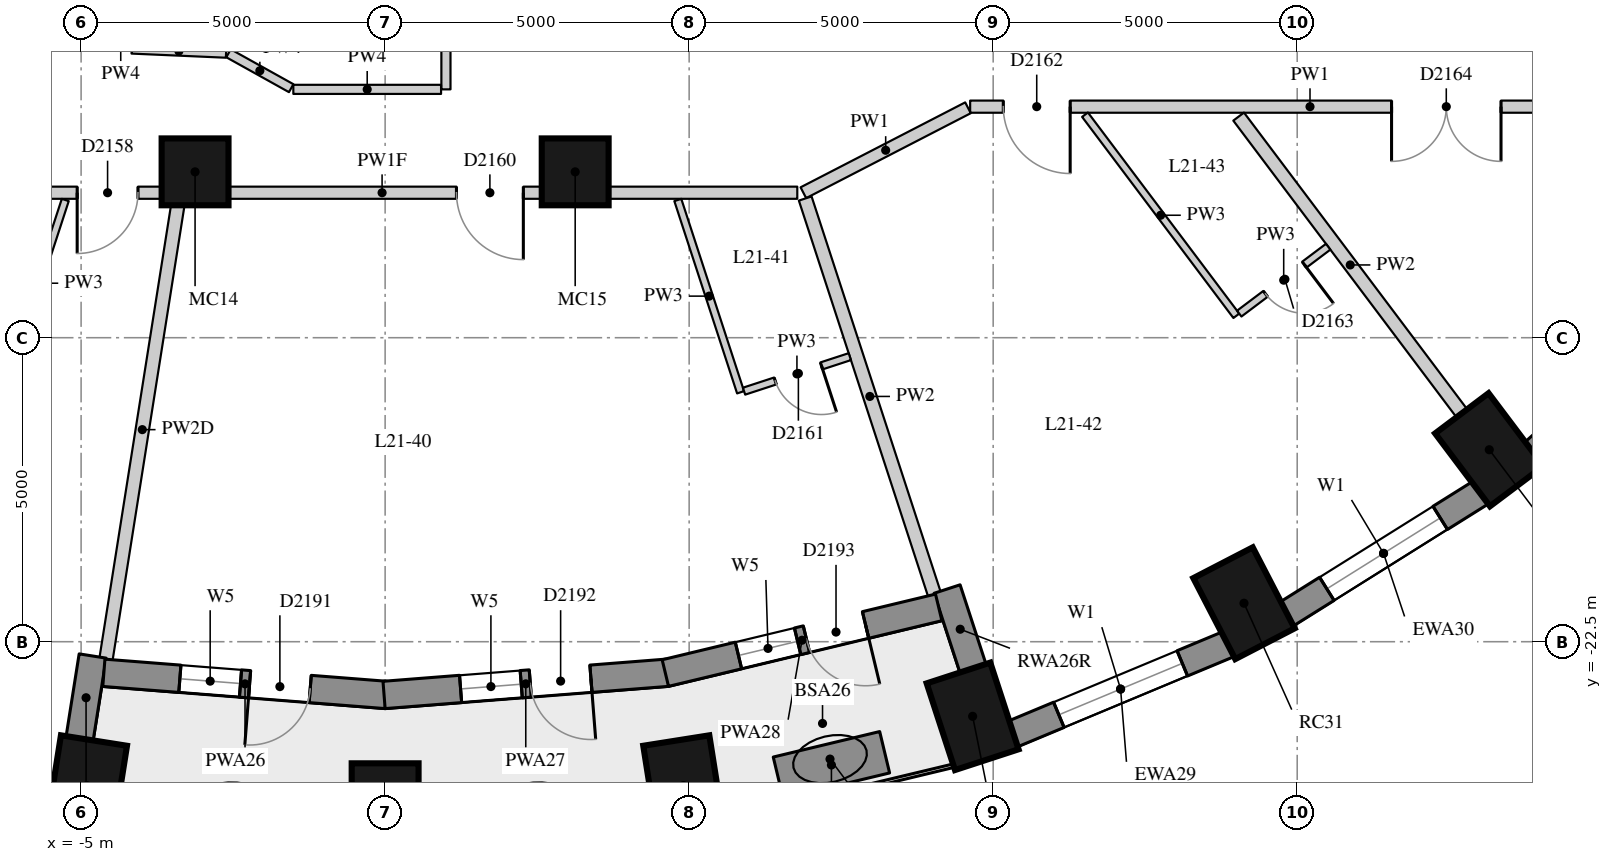
"""IFC4 building model, lengths in metres.
Left out: names, types, materials, properties, quantities, classifications, styles, units other than length and angle.
Written with IfcOpenShell. Run it as: python <this file> out.ifc"""

import sys

from ifc_helpers import new_model, si_unit, direction, frame, frame_2d, origin, origin_2d, place, context, subcontext, project, spatial, rectangle, extrude, element, fill, save


model = new_model("IFC4")
c1 = context("Model", 3, precision=1e-05, world=origin(), true_north=direction((0.0, 1.0)))
c2 = subcontext(c1, "Body", "Model", "MODEL_VIEW")
j1 = project(units=[si_unit("LENGTHUNIT", "METRE"), si_unit("PLANEANGLEUNIT", "RADIAN")], contexts=[c1])
p1 = place(None, origin())
s1 = spatial("IfcSite", under=j1, at=p1, CompositionType="ELEMENT")
p2 = place(p1, origin())
s2 = spatial("IfcBuilding", under=s1, at=p2, CompositionType="ELEMENT")
p3 = place(p2, frame((0.0, 0.0, 77.8)))
s3 = spatial("IfcBuildingStorey", under=s2, at=p3, CompositionType="ELEMENT", Elevation=77.8)
for number, where, z_axis, x_axis in (
    (1, (-4.906, -24.866, 0.0), (0.0, 0.0, 1.0), (-0.156, -0.988, 0.0)),
    (2, (0.0, -25.25, 0.0), (0.0, 0.0, 1.0), (0.0, -1.0, 0.0)),
    (3, (4.906, -24.866, 0.0), (0.0, 0.0, 1.0), (0.156, -0.988, 0.0)),
    (4, (9.662, -23.727, 0.0), (0.0, 0.0, 1.0), (0.31, -0.951, 0.0)),
    (5, (14.125, -21.867, 0.0), (0.0, 0.0, 1.0), (0.46, -0.888, 0.0)),
    (6, (18.159, -19.343, 0.0), (0.0, 0.0, 1.0), (0.601, -0.799, 0.0)),
):
    element("IfcColumn", number, at=place(p3, frame(where, z_axis=z_axis, x_axis=x_axis)), inside=s3, PredefinedType="COLUMN", context=c2, shape_type="SweptSolid", body=[
        extrude(rectangle(XDim=1.5, YDim=1.1, at=origin_2d()), origin(), (0.0, 0.0, 1.0), 3.3),
    ])
for number, where, z_axis, x_axis in (
    (7, (-3.126, -14.772, 0.0), (0.0, 0.0, 1.0), (1.0, 0.0, 0.0)),
    (8, (3.126, -14.772, 0.0), (0.0, 0.0, 1.0), (1.0, 0.0, 0.0)),
):
    element("IfcColumn", number, at=place(p3, frame(where, z_axis=z_axis, x_axis=x_axis)), inside=s3, PredefinedType="COLUMN", context=c2, shape_type="SweptSolid", body=[
        extrude(rectangle(XDim=1.1, YDim=1.1, at=origin_2d()), origin(), (0.0, 0.0, 1.0), 3.3),
    ])
p4 = place(p3, frame((-9.308, -24.35, 0.0), z_axis=(0.0, 0.0, 1.0), x_axis=(0.972496561493, -0.232917233979, 0.0)))
e9 = element("IfcWall", 9, at=p4, inside=s3, PredefinedType="SOLIDWALL", context=c2, shape_type="SweptSolid", body=[
    extrude(rectangle(XDim=3.911, YDim=0.45, at=frame_2d((1.956, 0.0))), origin(), (0.0, 0.0, 1.0), 3.02),
])
p5 = place(p4, frame((0.855, 0.0, 0.4)))
e10 = element("IfcOpeningElement", 10, at=p5, cuts=e9, PredefinedType="OPENING", context=c2, shape_type="SweptSolid", body=[
    extrude(rectangle(XDim=2.2, YDim=1.75, at=frame_2d((1.1, 0.875))), frame((0.0, 0.235, 0.0), z_axis=(0.0, -1.0, 0.0), x_axis=(1.0, 0.0, 0.0)), (0.0, 0.0, 1.0), 0.47),
])
p6 = place(p3, frame((10.315, -24.021, 0.0), z_axis=(0.0, 0.0, 1.0), x_axis=(0.923031964282, 0.384723267966, 0.0)))
e11 = element("IfcWall", 11, at=p6, inside=s3, PredefinedType="SOLIDWALL", context=c2, shape_type="SweptSolid", body=[
    extrude(rectangle(XDim=3.856, YDim=0.45, at=frame_2d((1.928, 0.0))), origin(), (0.0, 0.0, 1.0), 3.02),
])
p7 = place(p6, frame((0.828, 0.0, 0.4)))
e12 = element("IfcOpeningElement", 12, at=p7, cuts=e11, PredefinedType="OPENING", context=c2, shape_type="SweptSolid", body=[
    extrude(rectangle(XDim=2.2, YDim=1.75, at=frame_2d((1.1, 0.875))), frame((0.0, 0.235, 0.0), z_axis=(0.0, -1.0, 0.0), x_axis=(1.0, 0.0, 0.0)), (0.0, 0.0, 1.0), 0.47),
])
p8 = place(p3, frame((14.817, -22.051, 0.0), z_axis=(0.0, 0.0, 1.0), x_axis=(0.847635480093, 0.530579016629, 0.0)))
e13 = element("IfcWall", 13, at=p8, inside=s3, PredefinedType="SOLIDWALL", context=c2, shape_type="SweptSolid", body=[
    extrude(rectangle(XDim=3.782, YDim=0.45, at=frame_2d((1.891, 0.0))), origin(), (0.0, 0.0, 1.0), 3.02),
])
p9 = place(p8, frame((0.791, 0.0, 0.4)))
e14 = element("IfcOpeningElement", 14, at=p9, cuts=e13, PredefinedType="OPENING", context=c2, shape_type="SweptSolid", body=[
    extrude(rectangle(XDim=2.2, YDim=1.75, at=frame_2d((1.1, 0.875))), frame((0.0, 0.235, 0.0), z_axis=(0.0, -1.0, 0.0), x_axis=(1.0, 0.0, 0.0)), (0.0, 0.0, 1.0), 0.47),
])
p10 = place(p3, frame((18.871, -19.407, 0.0), z_axis=(0.0, 0.0, 1.0), x_axis=(0.745526233716, 0.66647628228, 0.0)))
e15 = element("IfcWall", 15, at=p10, inside=s3, PredefinedType="SOLIDWALL", context=c2, shape_type="SweptSolid", body=[
    extrude(rectangle(XDim=3.697, YDim=0.45, at=frame_2d((1.848, 0.0))), origin(), (0.0, 0.0, 1.0), 3.02),
])
p11 = place(p3, frame((-5.027, -24.108, 0.0), z_axis=(0.0, 0.0, 1.0), x_axis=(0.156133927791, 0.98773589415, 0.0)))
e16 = element("IfcWall", 16, at=p11, inside=s3, PredefinedType="SOLIDWALL", context=c2, shape_type="SweptSolid", body=[
    extrude(rectangle(XDim=1.39, YDim=0.45, at=frame_2d((0.695, 0.0))), origin(), (0.0, 0.0, 1.0), 2.47),
])
p12 = place(p3, frame((9.674, -22.956, 0.0), z_axis=(0.0, 0.0, 1.0), x_axis=(-0.310269011655, 0.950648799719, 0.0)))
e17 = element("IfcWall", 17, at=p12, inside=s3, PredefinedType="SOLIDWALL", context=c2, shape_type="SweptSolid", body=[
    extrude(rectangle(XDim=1.39, YDim=0.45, at=frame_2d((0.695, 0.0))), origin(), (0.0, 0.0, 1.0), 3.02),
])
p13 = place(p3, frame((-4.626, -23.011, 0.0), z_axis=(0.0, 0.0, 1.0), x_axis=(0.996937095772, -0.078207589615, 0.0)))
e18 = element("IfcWall", 18, at=p13, inside=s3, PredefinedType="SOLIDWALL", context=c2, shape_type="SweptSolid", body=[
    extrude(rectangle(XDim=4.657, YDim=0.45, at=frame_2d((2.329, 0.0))), origin(), (0.0, 0.0, 1.0), 3.02),
])
p14 = place(p13, frame((1.254, 0.0, 0.4)))
e19 = element("IfcOpeningElement", 19, at=p14, cuts=e18, PredefinedType="OPENING", context=c2, shape_type="SweptSolid", body=[
    extrude(rectangle(XDim=1.0, YDim=1.75, at=frame_2d((0.5, 0.875))), frame((0.0, 0.235, 0.0), z_axis=(0.0, -1.0, 0.0), x_axis=(1.0, 0.0, 0.0)), (0.0, 0.0, 1.0), 0.47),
])
p15 = place(p13, frame((2.404, 0.0, 0.0)))
e20 = element("IfcOpeningElement", 20, at=p15, cuts=e18, PredefinedType="OPENING", context=c2, shape_type="SweptSolid", body=[
    extrude(rectangle(XDim=1.0, YDim=2.15, at=frame_2d((0.5, 1.075))), frame((0.0, 0.235, 0.0), z_axis=(0.0, -1.0, 0.0), x_axis=(1.0, 0.0, 0.0)), (0.0, 0.0, 1.0), 0.47),
])
p16 = place(p3, frame((-0.018, -23.376, 0.0), z_axis=(0.0, 0.0, 1.0), x_axis=(0.996935982964, 0.078221773648, 0.0)))
e21 = element("IfcWall", 21, at=p16, inside=s3, PredefinedType="SOLIDWALL", context=c2, shape_type="SweptSolid", body=[
    extrude(rectangle(XDim=4.676, YDim=0.45, at=frame_2d((2.338, 0.0))), origin(), (0.0, 0.0, 1.0), 3.02),
])
p17 = place(p16, frame((1.263, 0.0, 0.4)))
e22 = element("IfcOpeningElement", 22, at=p17, cuts=e21, PredefinedType="OPENING", context=c2, shape_type="SweptSolid", body=[
    extrude(rectangle(XDim=1.0, YDim=1.75, at=frame_2d((0.5, 0.875))), frame((0.0, 0.235, 0.0), z_axis=(0.0, -1.0, 0.0), x_axis=(1.0, 0.0, 0.0)), (0.0, 0.0, 1.0), 0.47),
])
p18 = place(p16, frame((2.413, 0.0, 0.0)))
e23 = element("IfcOpeningElement", 23, at=p18, cuts=e21, PredefinedType="OPENING", context=c2, shape_type="SweptSolid", body=[
    extrude(rectangle(XDim=1.0, YDim=2.15, at=frame_2d((0.5, 1.075))), frame((0.0, 0.235, 0.0), z_axis=(0.0, -1.0, 0.0), x_axis=(1.0, 0.0, 0.0)), (0.0, 0.0, 1.0), 0.47),
])
p19 = place(p3, frame((4.608, -23.016, 0.0), z_axis=(0.0, 0.0, 1.0), x_axis=(0.972343667289, 0.233554688847, 0.0)))
e24 = element("IfcWall", 24, at=p19, inside=s3, PredefinedType="SOLIDWALL", context=c2, shape_type="SweptSolid", body=[
    extrude(rectangle(XDim=4.624, YDim=0.45, at=frame_2d((2.312, 0.0))), origin(), (0.0, 0.0, 1.0), 3.02),
])
p20 = place(p19, frame((1.237, 0.0, 0.4)))
e25 = element("IfcOpeningElement", 25, at=p20, cuts=e24, PredefinedType="OPENING", context=c2, shape_type="SweptSolid", body=[
    extrude(rectangle(XDim=1.0, YDim=1.75, at=frame_2d((0.5, 0.875))), frame((0.0, 0.235, 0.0), z_axis=(0.0, -1.0, 0.0), x_axis=(1.0, 0.0, 0.0)), (0.0, 0.0, 1.0), 0.47),
])
p21 = place(p19, frame((2.387, 0.0, 0.0)))
e26 = element("IfcOpeningElement", 26, at=p21, cuts=e24, PredefinedType="OPENING", context=c2, shape_type="SweptSolid", body=[
    extrude(rectangle(XDim=1.0, YDim=2.15, at=frame_2d((0.5, 1.075))), frame((0.0, 0.235, 0.0), z_axis=(0.0, -1.0, 0.0), x_axis=(1.0, 0.0, 0.0)), (0.0, 0.0, 1.0), 0.47),
])
p22 = place(p3, frame((6.465, -24.737, 0.0), z_axis=(0.0, 0.0, 1.0), x_axis=(0.972504142103, 0.232885580473, 0.0)))
e27 = element("IfcWall", 27, at=p22, inside=s3, PredefinedType="USERDEFINED", context=c2, shape_type="SweptSolid", body=[
    extrude(rectangle(XDim=1.8, YDim=0.7, at=frame_2d((0.9, 0.0))), origin(), (0.0, 0.0, 1.0), 0.75),
])
p23 = place(p3, frame((20.8, -13.7, 0.0), z_axis=(0.0, 0.0, 1.0), x_axis=(-1.0, 0.0, 0.0)))
e28 = element("IfcWall", 28, at=p23, inside=s3, PredefinedType="PARTITIONING", context=c2, shape_type="SweptSolid", body=[
    extrude(rectangle(XDim=11.178, YDim=0.2, at=frame_2d((5.589, 0.0))), origin(), (0.0, 0.0, 1.0), 3.02),
])
p24 = place(p23, frame((9.534, 0.0, 0.0)))
e29 = element("IfcOpeningElement", 29, at=p24, cuts=e28, PredefinedType="OPENING", context=c2, shape_type="SweptSolid", body=[
    extrude(rectangle(XDim=1.1, YDim=2.1, at=frame_2d((0.55, 1.05))), frame((0.0, 0.11, 0.0), z_axis=(0.0, -1.0, 0.0), x_axis=(1.0, 0.0, 0.0)), (0.0, 0.0, 1.0), 0.22),
])
p25 = place(p23, frame((2.448, 0.0, 0.0)))
e30 = element("IfcOpeningElement", 30, at=p25, cuts=e28, PredefinedType="OPENING", context=c2, shape_type="SweptSolid", body=[
    extrude(rectangle(XDim=1.8, YDim=2.1, at=frame_2d((0.9, 1.05))), frame((0.0, 0.11, 0.0), z_axis=(0.0, -1.0, 0.0), x_axis=(1.0, 0.0, 0.0)), (0.0, 0.0, 1.0), 0.22),
])
p26 = place(p3, frame((9.586, -13.719, 0.0), z_axis=(0.0, 0.0, 1.0), x_axis=(-0.888664904046, -0.458557181076, 0.0)))
e31 = element("IfcWall", 31, at=p26, inside=s3, PredefinedType="PARTITIONING", context=c2, shape_type="SweptSolid", body=[
    extrude(rectangle(XDim=3.046, YDim=0.2, at=frame_2d((1.523, 0.0))), origin(), (0.0, 0.0, 1.0), 3.02),
])
p27 = place(p3, frame((6.778, -15.115, 0.0), z_axis=(0.0, 0.0, 1.0), x_axis=(-1.0, 0.0, 0.0)))
e32 = element("IfcWall", 32, at=p27, inside=s3, PredefinedType="PARTITIONING", context=c2, shape_type="SweptSolid", body=[
    extrude(rectangle(XDim=13.657, YDim=0.2, at=frame_2d((6.828, 0.0))), origin(), (0.0, 0.0, 1.0), 2.42),
])
p28 = place(p27, frame((10.843, 0.0, 0.0)))
e33 = element("IfcOpeningElement", 33, at=p28, cuts=e32, PredefinedType="OPENING", context=c2, shape_type="SweptSolid", body=[
    extrude(rectangle(XDim=1.0, YDim=2.1, at=frame_2d((0.5, 1.05))), frame((0.0, 0.11, 0.0), z_axis=(0.0, -1.0, 0.0), x_axis=(1.0, 0.0, 0.0)), (0.0, 0.0, 1.0), 0.22),
])
p29 = place(p27, frame((4.505, 0.0, 0.0)))
e34 = element("IfcOpeningElement", 34, at=p29, cuts=e32, PredefinedType="OPENING", context=c2, shape_type="SweptSolid", body=[
    extrude(rectangle(XDim=1.1, YDim=2.1, at=frame_2d((0.55, 1.05))), frame((0.0, 0.11, 0.0), z_axis=(0.0, -1.0, 0.0), x_axis=(1.0, 0.0, 0.0)), (0.0, 0.0, 1.0), 0.22),
])
p30 = place(p3, frame((1.0, -9.23, 0.0), z_axis=(0.0, 0.0, 1.0), x_axis=(0.0, -1.0, 0.0)))
e35 = element("IfcWall", 35, at=p30, inside=s3, PredefinedType="PARTITIONING", context=c2, shape_type="SweptSolid", body=[
    extrude(rectangle(XDim=4.186, YDim=0.15, at=frame_2d((2.093, 0.0))), origin(), (0.0, 0.0, 1.0), 3.02),
])
p31 = place(p3, frame((0.92, -13.416, 0.0), z_axis=(0.0, 0.0, 1.0), x_axis=(-1.0, 0.0, 0.0)))
e36 = element("IfcWall", 36, at=p31, inside=s3, PredefinedType="PARTITIONING", context=c2, shape_type="SweptSolid", body=[
    extrude(rectangle(XDim=2.43, YDim=0.15, at=frame_2d((1.215, 0.0))), origin(), (0.0, 0.0, 1.0), 3.02),
])
p32 = place(p3, frame((-1.545, -13.396, 0.0), z_axis=(0.0, 0.0, 1.0), x_axis=(-0.873678559566, 0.486503622345, 0.0)))
e37 = element("IfcWall", 37, at=p32, inside=s3, PredefinedType="PARTITIONING", context=c2, shape_type="SweptSolid", body=[
    extrude(rectangle(XDim=1.18, YDim=0.15, at=frame_2d((0.59, 0.0))), origin(), (0.0, 0.0, 1.0), 3.02),
])
p33 = place(p3, frame((-2.616, -12.82, 0.0), z_axis=(0.0, 0.0, 1.0), x_axis=(-0.99904515517, 0.04368956318, 0.0)))
e38 = element("IfcWall", 38, at=p33, inside=s3, PredefinedType="PARTITIONING", context=c2, shape_type="SweptSolid", body=[
    extrude(rectangle(XDim=1.553, YDim=0.15, at=frame_2d((0.777, 0.0))), origin(), (0.0, 0.0, 1.0), 3.02),
])
p34 = place(p3, frame((-4.591, -22.789, 0.0), z_axis=(0.0, 0.0, 1.0), x_axis=(0.156151107863, 0.987733178299, 0.0)))
e39 = element("IfcWall", 39, at=p34, inside=s3, PredefinedType="PARTITIONING", context=c2, shape_type="SweptSolid", body=[
    extrude(rectangle(XDim=7.647, YDim=0.22, at=frame_2d((3.823, 0.0))), origin(), (0.0, 0.0, 1.0), 2.47),
])
p35 = place(p3, frame((9.034, -21.721, 0.0), z_axis=(0.0, 0.0, 1.0), x_axis=(-0.310286072156, 0.95064323141, 0.0)))
e40 = element("IfcWall", 40, at=p35, inside=s3, PredefinedType="PARTITIONING", context=c2, shape_type="SweptSolid", body=[
    extrude(rectangle(XDim=6.849, YDim=0.22, at=frame_2d((3.424, 0.0))), origin(), (0.0, 0.0, 1.0), 3.02),
])
p36 = place(p3, frame((17.708, -18.743, 0.0), z_axis=(0.0, 0.0, 1.0), x_axis=(-0.601170031872, 0.799121137738, 0.0)))
e41 = element("IfcWall", 41, at=p36, inside=s3, PredefinedType="PARTITIONING", context=c2, shape_type="SweptSolid", body=[
    extrude(rectangle(XDim=6.106, YDim=0.22, at=frame_2d((3.053, 0.0))), origin(), (0.0, 0.0, 1.0), 3.02),
])
p37 = place(p3, frame((-5.26, -15.235, 0.0), z_axis=(0.0, 0.0, 1.0), x_axis=(-0.310220453498, -0.950664646567, 0.0)))
e42 = element("IfcWall", 42, at=p37, inside=s3, PredefinedType="PARTITIONING", context=c2, shape_type="SweptSolid", body=[
    extrude(rectangle(XDim=2.88, YDim=0.12, at=frame_2d((1.44, 0.0))), origin(), (0.0, 0.0, 1.0), 3.02),
])
p38 = place(p3, frame((4.813, -15.235, 0.0), z_axis=(0.0, 0.0, 1.0), x_axis=(0.310233981264, -0.950660232086, 0.0)))
e43 = element("IfcWall", 43, at=p38, inside=s3, PredefinedType="PARTITIONING", context=c2, shape_type="SweptSolid", body=[
    extrude(rectangle(XDim=3.327, YDim=0.12, at=frame_2d((1.664, 0.0))), origin(), (0.0, 0.0, 1.0), 3.02),
])
p39 = place(p3, frame((11.51, -13.832, 0.0), z_axis=(0.0, 0.0, 1.0), x_axis=(0.60115060605, -0.7991357512, 0.0)))
e44 = element("IfcWall", 44, at=p39, inside=s3, PredefinedType="PARTITIONING", context=c2, shape_type="SweptSolid", body=[
    extrude(rectangle(XDim=4.14, YDim=0.12, at=frame_2d((2.07, 0.0))), origin(), (0.0, 0.0, 1.0), 3.02),
])
p40 = place(p3, frame((5.903, -18.379, 0.0), z_axis=(0.0, 0.0, 1.0), x_axis=(0.950626343776, 0.310337807105, 0.0)))
e45 = element("IfcWall", 45, at=p40, inside=s3, PredefinedType="PARTITIONING", context=c2, shape_type="SweptSolid", body=[
    extrude(rectangle(XDim=1.83, YDim=0.12, at=frame_2d((0.915, 0.0))), origin(), (0.0, 0.0, 1.0), 3.02),
])
p41 = place(p40, frame((0.54, 0.0, 0.0)))
e46 = element("IfcOpeningElement", 46, at=p41, cuts=e45, PredefinedType="OPENING", context=c2, shape_type="SweptSolid", body=[
    extrude(rectangle(XDim=0.8, YDim=2.1, at=frame_2d((0.4, 1.05))), frame((0.0, 0.07, 0.0), z_axis=(0.0, -1.0, 0.0), x_axis=(1.0, 0.0, 0.0)), (0.0, 0.0, 1.0), 0.14),
])
p42 = place(p3, frame((14.047, -17.104, 0.0), z_axis=(0.0, 0.0, 1.0), x_axis=(0.799182868338, 0.601087966071, 0.0)))
e47 = element("IfcWall", 47, at=p42, inside=s3, PredefinedType="PARTITIONING", context=c2, shape_type="SweptSolid", body=[
    extrude(rectangle(XDim=1.83, YDim=0.12, at=frame_2d((0.915, 0.0))), origin(), (0.0, 0.0, 1.0), 3.02),
])
p43 = place(p42, frame((0.54, 0.0, 0.0)))
e48 = element("IfcOpeningElement", 48, at=p43, cuts=e47, PredefinedType="OPENING", context=c2, shape_type="SweptSolid", body=[
    extrude(rectangle(XDim=0.8, YDim=2.1, at=frame_2d((0.4, 1.05))), frame((0.0, 0.07, 0.0), z_axis=(0.0, -1.0, 0.0), x_axis=(1.0, 0.0, 0.0)), (0.0, 0.0, 1.0), 0.14),
])
p44 = place(p7, origin())
e49 = element("IfcWindow", 49, at=p44, inside=s3, PartitioningType="SINGLE_PANEL", PredefinedType="WINDOW", context=c2, shape_type="SweptSolid", body=[
    extrude(rectangle(XDim=2.2, YDim=1.75, at=frame_2d((1.1, 0.875))), frame((0.0, 0.035, 0.0), z_axis=(0.0, -1.0, 0.0), x_axis=(1.0, 0.0, 0.0)), (0.0, 0.0, 1.0), 0.06),
])
fill(e12, e49)
p45 = place(p9, origin())
e50 = element("IfcWindow", 50, at=p45, inside=s3, PartitioningType="SINGLE_PANEL", PredefinedType="WINDOW", context=c2, shape_type="SweptSolid", body=[
    extrude(rectangle(XDim=2.2, YDim=1.75, at=frame_2d((1.1, 0.875))), frame((0.0, 0.035, 0.0), z_axis=(0.0, -1.0, 0.0), x_axis=(1.0, 0.0, 0.0)), (0.0, 0.0, 1.0), 0.06),
])
fill(e14, e50)
p46 = place(p14, origin())
e51 = element("IfcWindow", 51, at=p46, inside=s3, PartitioningType="SINGLE_PANEL", PredefinedType="WINDOW", context=c2, shape_type="SweptSolid", body=[
    extrude(rectangle(XDim=1.0, YDim=1.75, at=frame_2d((0.5, 0.875))), frame((0.0, 0.035, 0.0), z_axis=(0.0, -1.0, 0.0), x_axis=(1.0, 0.0, 0.0)), (0.0, 0.0, 1.0), 0.06),
])
fill(e19, e51)
p47 = place(p15, frame((1.0, 0.0, 0.0), z_axis=(0.0, 0.0, 1.0), x_axis=(-1.0, 0.0, 0.0)))
e52 = element("IfcDoor", 52, at=p47, inside=s3, OperationType="SINGLE_SWING_RIGHT", PredefinedType="DOOR", context=c2, shape_type="SweptSolid", body=[
    extrude(rectangle(XDim=1.0, YDim=2.15, at=frame_2d((0.5, 1.075))), frame((0.0, 0.075, 0.0), z_axis=(0.0, -1.0, 0.0), x_axis=(1.0, 0.0, 0.0)), (0.0, 0.0, 1.0), 0.05),
])
fill(e20, e52)
p48 = place(p17, origin())
e53 = element("IfcWindow", 53, at=p48, inside=s3, PartitioningType="SINGLE_PANEL", PredefinedType="WINDOW", context=c2, shape_type="SweptSolid", body=[
    extrude(rectangle(XDim=1.0, YDim=1.75, at=frame_2d((0.5, 0.875))), frame((0.0, 0.035, 0.0), z_axis=(0.0, -1.0, 0.0), x_axis=(1.0, 0.0, 0.0)), (0.0, 0.0, 1.0), 0.06),
])
fill(e22, e53)
p49 = place(p18, frame((1.0, 0.0, 0.0), z_axis=(0.0, 0.0, 1.0), x_axis=(-1.0, 0.0, 0.0)))
e54 = element("IfcDoor", 54, at=p49, inside=s3, OperationType="SINGLE_SWING_LEFT", PredefinedType="DOOR", context=c2, shape_type="SweptSolid", body=[
    extrude(rectangle(XDim=1.0, YDim=2.15, at=frame_2d((0.5, 1.075))), frame((0.0, 0.075, 0.0), z_axis=(0.0, -1.0, 0.0), x_axis=(1.0, 0.0, 0.0)), (0.0, 0.0, 1.0), 0.05),
])
fill(e23, e54)
p50 = place(p20, origin())
e55 = element("IfcWindow", 55, at=p50, inside=s3, PartitioningType="SINGLE_PANEL", PredefinedType="WINDOW", context=c2, shape_type="SweptSolid", body=[
    extrude(rectangle(XDim=1.0, YDim=1.75, at=frame_2d((0.5, 0.875))), frame((0.0, 0.035, 0.0), z_axis=(0.0, -1.0, 0.0), x_axis=(1.0, 0.0, 0.0)), (0.0, 0.0, 1.0), 0.06),
])
fill(e25, e55)
p51 = place(p21, frame((1.0, 0.0, 0.0), z_axis=(0.0, 0.0, 1.0), x_axis=(-1.0, 0.0, 0.0)))
e56 = element("IfcDoor", 56, at=p51, inside=s3, OperationType="SINGLE_SWING_LEFT", PredefinedType="DOOR", context=c2, shape_type="SweptSolid", body=[
    extrude(rectangle(XDim=1.0, YDim=2.15, at=frame_2d((0.5, 1.075))), frame((0.0, 0.075, 0.0), z_axis=(0.0, -1.0, 0.0), x_axis=(1.0, 0.0, 0.0)), (0.0, 0.0, 1.0), 0.05),
])
fill(e26, e56)
p52 = place(p28, origin())
e57 = element("IfcDoor", 57, at=p52, inside=s3, OperationType="SINGLE_SWING_RIGHT", PredefinedType="DOOR", context=c2, shape_type="SweptSolid", body=[
    extrude(rectangle(XDim=1.0, YDim=2.1, at=frame_2d((0.5, 1.05))), frame((0.0, 0.025, 0.0), z_axis=(0.0, -1.0, 0.0), x_axis=(1.0, 0.0, 0.0)), (0.0, 0.0, 1.0), 0.05),
])
fill(e33, e57)
p53 = place(p29, origin())
e58 = element("IfcDoor", 58, at=p53, inside=s3, OperationType="SINGLE_SWING_LEFT", PredefinedType="DOOR", context=c2, shape_type="SweptSolid", body=[
    extrude(rectangle(XDim=1.1, YDim=2.1, at=frame_2d((0.55, 1.05))), frame((0.0, 0.025, 0.0), z_axis=(0.0, -1.0, 0.0), x_axis=(1.0, 0.0, 0.0)), (0.0, 0.0, 1.0), 0.05),
])
fill(e34, e58)
p54 = place(p41, origin())
e59 = element("IfcDoor", 59, at=p54, inside=s3, OperationType="SINGLE_SWING_LEFT", PredefinedType="DOOR", context=c2, shape_type="SweptSolid", body=[
    extrude(rectangle(XDim=0.8, YDim=2.1, at=frame_2d((0.4, 1.05))), frame((0.0, 0.025, 0.0), z_axis=(0.0, -1.0, 0.0), x_axis=(1.0, 0.0, 0.0)), (0.0, 0.0, 1.0), 0.05),
])
fill(e46, e59)
p55 = place(p24, origin())
e60 = element("IfcDoor", 60, at=p55, inside=s3, OperationType="SINGLE_SWING_LEFT", PredefinedType="DOOR", context=c2, shape_type="SweptSolid", body=[
    extrude(rectangle(XDim=1.1, YDim=2.1, at=frame_2d((0.55, 1.05))), frame((0.0, 0.025, 0.0), z_axis=(0.0, -1.0, 0.0), x_axis=(1.0, 0.0, 0.0)), (0.0, 0.0, 1.0), 0.05),
])
fill(e29, e60)
p56 = place(p43, origin())
e61 = element("IfcDoor", 61, at=p56, inside=s3, OperationType="SINGLE_SWING_LEFT", PredefinedType="DOOR", context=c2, shape_type="SweptSolid", body=[
    extrude(rectangle(XDim=0.8, YDim=2.1, at=frame_2d((0.4, 1.05))), frame((0.0, 0.025, 0.0), z_axis=(0.0, -1.0, 0.0), x_axis=(1.0, 0.0, 0.0)), (0.0, 0.0, 1.0), 0.05),
])
fill(e48, e61)
p57 = place(p25, origin())
e62 = element("IfcDoor", 62, at=p57, inside=s3, OperationType="DOUBLE_DOOR_SINGLE_SWING", PredefinedType="DOOR", context=c2, shape_type="SweptSolid", body=[
    extrude(rectangle(XDim=1.8, YDim=2.1, at=frame_2d((0.9, 1.05))), frame((0.0, 0.025, 0.0), z_axis=(0.0, -1.0, 0.0), x_axis=(1.0, 0.0, 0.0)), (0.0, 0.0, 1.0), 0.05),
])
fill(e30, e62)
save(model, sys.argv[1])
